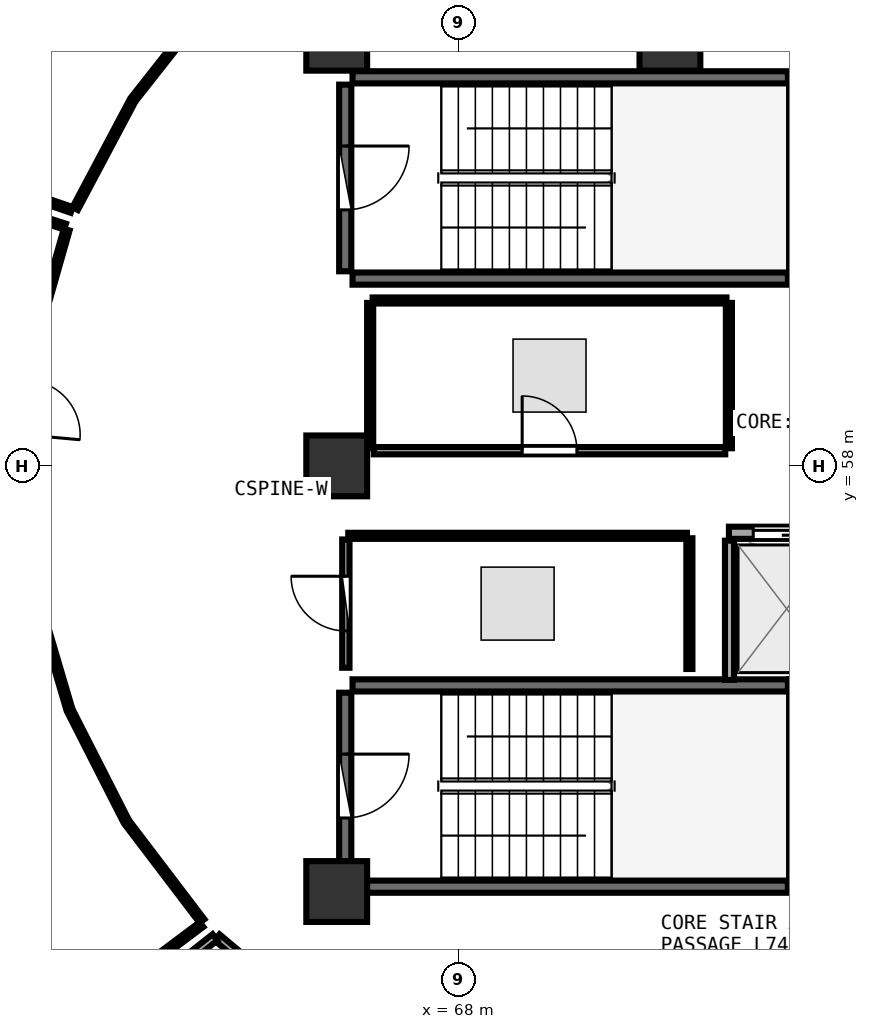
"""IFC4 building model, lengths in metres.
Left out: names, types, materials, properties, quantities, classifications, styles, units other than length and angle.
Written with IfcOpenShell. Run it as: python <this file> out.ifc"""

import sys

from ifc_helpers import new_model, si_unit, direction, frame, frame_2d, origin, origin_2d, place, context, subcontext, project, spatial, rectangle, extrude, element, fill, save


model = new_model("IFC4")
c1 = context("Model", 3, precision=1e-05, world=origin(), true_north=direction((0.0, 1.0)))
c2 = subcontext(c1, "Body", "Model", "MODEL_VIEW")
j1 = project(units=[si_unit("LENGTHUNIT", "METRE"), si_unit("PLANEANGLEUNIT", "RADIAN")], contexts=[c1])
p1 = place(None, origin())
s1 = spatial("IfcSite", under=j1, at=p1, CompositionType="ELEMENT")
p2 = place(p1, origin())
s2 = spatial("IfcBuilding", under=s1, at=p2, CompositionType="ELEMENT")
p3 = place(p2, frame((0.0, 0.0, 289.95)))
s3 = spatial("IfcBuildingStorey", under=s2, at=p3, CompositionType="ELEMENT", Elevation=289.95)
for number, where, z_axis, x_axis in (
    (1, (66.0, 51.0, 0.0), (0.0, 0.0, 1.0), (1.0, 0.0, 0.0)),
    (2, (71.48, 65.0, 0.0), (0.0, 0.0, 1.0), (1.0, 0.0, 0.0)),
    (3, (66.0, 65.0, 0.0), (0.0, 0.0, 1.0), (1.0, 0.0, 0.0)),
    (4, (66.0, 58.0, 0.0), (0.0, 0.0, 1.0), (1.0, 0.0, 0.0)),
):
    element("IfcColumn", number, at=place(p3, frame(where, z_axis=z_axis, x_axis=x_axis)), inside=s3, PredefinedType="PILASTER", context=c2, shape_type="SweptSolid", body=[
        extrude(rectangle(XDim=1.0, YDim=1.0, at=origin_2d()), origin(), (0.0, 0.0, 1.0), 3.75),
    ])
p4 = place(p3, frame((66.26, 61.08, 0.0), z_axis=(0.0, 0.0, 1.0), x_axis=(1.0, 0.0, 0.0)))
e5 = element("IfcWall", 5, at=p4, inside=s3, PredefinedType="SHEAR", context=c2, shape_type="SweptSolid", body=[
    extrude(rectangle(XDim=7.16, YDim=0.2, at=frame_2d((3.58, 0.0))), origin(), (0.0, 0.0, 1.0), 3.43),
])
p5 = place(p3, frame((73.54, 61.2, 0.0), z_axis=(0.0, 0.0, 1.0), x_axis=(0.0, 1.0, 0.0)))
e6 = element("IfcWall", 6, at=p5, inside=s3, PredefinedType="SHEAR", context=c2, shape_type="SweptSolid", body=[
    extrude(rectangle(XDim=3.07, YDim=0.2, at=frame_2d((1.535, 0.0))), origin(), (0.0, 0.0, 1.0), 3.43),
])
p6 = place(p3, frame((73.42, 64.39, 0.0), z_axis=(0.0, 0.0, 1.0), x_axis=(-1.0, 0.0, 0.0)))
e7 = element("IfcWall", 7, at=p6, inside=s3, PredefinedType="SHEAR", context=c2, shape_type="SweptSolid", body=[
    extrude(rectangle(XDim=7.16, YDim=0.2, at=frame_2d((3.58, 0.0))), origin(), (0.0, 0.0, 1.0), 3.43),
])
p7 = place(p3, frame((66.14, 64.27, 0.0), z_axis=(0.0, 0.0, 1.0), x_axis=(0.0, -1.0, 0.0)))
e8 = element("IfcWall", 8, at=p7, inside=s3, PredefinedType="SHEAR", context=c2, shape_type="SweptSolid", body=[
    extrude(rectangle(XDim=3.07, YDim=0.2, at=frame_2d((1.535, 0.0))), origin(), (0.0, 0.0, 1.0), 3.43),
])
p8 = place(p7, frame((1.01, 0.0, 0.0)))
e9 = element("IfcOpeningElement", 9, at=p8, cuts=e8, PredefinedType="OPENING", context=c2, shape_type="SweptSolid", body=[
    extrude(rectangle(XDim=1.05, YDim=2.1, at=frame_2d((0.525, 1.05))), frame((0.0, 0.11, 0.0), z_axis=(0.0, -1.0, 0.0), x_axis=(1.0, 0.0, 0.0)), (0.0, 0.0, 1.0), 0.22),
])
p9 = place(p3, frame((81.9, 54.39, 0.0), z_axis=(0.0, 0.0, 1.0), x_axis=(-1.0, 0.0, 0.0)))
e10 = element("IfcWall", 10, at=p9, inside=s3, PredefinedType="SHEAR", context=c2, shape_type="SweptSolid", body=[
    extrude(rectangle(XDim=8.46, YDim=0.2, at=frame_2d((4.23, 0.0))), origin(), (0.0, 0.0, 1.0), 3.43),
])
p10 = place(p3, frame((66.26, 51.08, 0.0), z_axis=(0.0, 0.0, 1.0), x_axis=(1.0, 0.0, 0.0)))
e11 = element("IfcWall", 11, at=p10, inside=s3, PredefinedType="SHEAR", context=c2, shape_type="SweptSolid", body=[
    extrude(rectangle(XDim=7.16, YDim=0.2, at=frame_2d((3.58, 0.0))), origin(), (0.0, 0.0, 1.0), 3.43),
])
p11 = place(p3, frame((73.54, 51.2, 0.0), z_axis=(0.0, 0.0, 1.0), x_axis=(0.0, 1.0, 0.0)))
e12 = element("IfcWall", 12, at=p11, inside=s3, PredefinedType="SHEAR", context=c2, shape_type="SweptSolid", body=[
    extrude(rectangle(XDim=3.07, YDim=0.2, at=frame_2d((1.535, 0.0))), origin(), (0.0, 0.0, 1.0), 3.43),
])
p12 = place(p3, frame((73.42, 54.39, 0.0), z_axis=(0.0, 0.0, 1.0), x_axis=(-1.0, 0.0, 0.0)))
e13 = element("IfcWall", 13, at=p12, inside=s3, PredefinedType="SHEAR", context=c2, shape_type="SweptSolid", body=[
    extrude(rectangle(XDim=7.16, YDim=0.2, at=frame_2d((3.58, 0.0))), origin(), (0.0, 0.0, 1.0), 3.43),
])
p13 = place(p3, frame((66.14, 54.27, 0.0), z_axis=(0.0, 0.0, 1.0), x_axis=(0.0, -1.0, 0.0)))
e14 = element("IfcWall", 14, at=p13, inside=s3, PredefinedType="SHEAR", context=c2, shape_type="SweptSolid", body=[
    extrude(rectangle(XDim=3.07, YDim=0.2, at=frame_2d((1.535, 0.0))), origin(), (0.0, 0.0, 1.0), 3.43),
])
p14 = place(p13, frame((1.01, 0.0, 0.0)))
e15 = element("IfcOpeningElement", 15, at=p14, cuts=e14, PredefinedType="OPENING", context=c2, shape_type="SweptSolid", body=[
    extrude(rectangle(XDim=1.05, YDim=2.1, at=frame_2d((0.525, 1.05))), frame((0.0, 0.11, 0.0), z_axis=(0.0, -1.0, 0.0), x_axis=(1.0, 0.0, 0.0)), (0.0, 0.0, 1.0), 0.22),
])
p15 = place(p3, frame((72.45, 56.9, 0.0), z_axis=(0.0, 0.0, 1.0), x_axis=(1.0, 0.0, 0.0)))
e16 = element("IfcWall", 16, at=p15, inside=s3, PredefinedType="SOLIDWALL", context=c2, shape_type="SweptSolid", body=[
    extrude(rectangle(XDim=8.4, YDim=0.2, at=frame_2d((4.2, 0.0))), origin(), (0.0, 0.0, 1.0), 3.42),
])
p16 = place(p15, frame((0.4, 0.0, 0.0)))
e17 = element("IfcOpeningElement", 17, at=p16, cuts=e16, PredefinedType="OPENING", context=c2, shape_type="SweptSolid", body=[
    extrude(rectangle(XDim=1.1, YDim=2.1, at=frame_2d((0.55, 1.05))), frame((0.0, 0.11, 0.0), z_axis=(0.0, -1.0, 0.0), x_axis=(1.0, 0.0, 0.0)), (0.0, 0.0, 1.0), 0.22),
])
p17 = place(p15, frame((2.4, 0.0, 0.0)))
e18 = element("IfcOpeningElement", 18, at=p17, cuts=e16, PredefinedType="OPENING", context=c2, shape_type="SweptSolid", body=[
    extrude(rectangle(XDim=1.1, YDim=2.1, at=frame_2d((0.55, 1.05))), frame((0.0, 0.11, 0.0), z_axis=(0.0, -1.0, 0.0), x_axis=(1.0, 0.0, 0.0)), (0.0, 0.0, 1.0), 0.22),
])
p18 = place(p3, frame((72.46, 54.48, 0.0), z_axis=(0.0, 0.0, 1.0), x_axis=(0.0, 1.0, 0.0)))
e19 = element("IfcWall", 19, at=p18, inside=s3, PredefinedType="PARTITIONING", context=c2, shape_type="SweptSolid", body=[
    extrude(rectangle(XDim=2.29, YDim=0.15, at=frame_2d((1.145, 0.0))), origin(), (0.0, 0.0, 1.0), 3.42),
])
p19 = place(p3, frame((66.61, 58.25, 0.0), z_axis=(0.0, 0.0, 1.0), x_axis=(1.0, 0.0, 0.0)))
e20 = element("IfcWall", 20, at=p19, inside=s3, PredefinedType="PARTITIONING", context=c2, shape_type="SweptSolid", body=[
    extrude(rectangle(XDim=5.78, YDim=0.12, at=frame_2d((2.89, 0.0))), origin(), (0.0, 0.0, 1.0), 3.42),
])
p20 = place(p19, frame((2.44, 0.0, 0.0)))
e21 = element("IfcOpeningElement", 21, at=p20, cuts=e20, PredefinedType="OPENING", context=c2, shape_type="SweptSolid", body=[
    extrude(rectangle(XDim=0.9, YDim=2.08, at=frame_2d((0.45, 1.04))), frame((0.0, 0.07, 0.0), z_axis=(0.0, -1.0, 0.0), x_axis=(1.0, 0.0, 0.0)), (0.0, 0.0, 1.0), 0.14),
])
p21 = place(p3, frame((66.15, 54.68, 0.0), z_axis=(0.0, 0.0, 1.0), x_axis=(0.0, 1.0, 0.0)))
e22 = element("IfcWall", 22, at=p21, inside=s3, PredefinedType="PARTITIONING", context=c2, shape_type="SweptSolid", body=[
    extrude(rectangle(XDim=2.11, YDim=0.12, at=frame_2d((1.055, 0.0))), origin(), (0.0, 0.0, 1.0), 2.715),
])
p22 = place(p21, frame((0.605, 0.0, 0.0)))
e23 = element("IfcOpeningElement", 23, at=p22, cuts=e22, PredefinedType="OPENING", context=c2, shape_type="SweptSolid", body=[
    extrude(rectangle(XDim=0.9, YDim=2.08, at=frame_2d((0.45, 1.04))), frame((0.0, 0.07, 0.0), z_axis=(0.0, -1.0, 0.0), x_axis=(1.0, 0.0, 0.0)), (0.0, 0.0, 1.0), 0.14),
])
p23 = place(p3, frame((72.45, 58.29, 0.0), z_axis=(0.0, 0.0, 1.0), x_axis=(0.0, 1.0, 0.0)))
e24 = element("IfcWall", 24, at=p23, inside=s3, PredefinedType="PARTITIONING", context=c2, shape_type="SweptSolid", body=[
    extrude(rectangle(XDim=2.39, YDim=0.1, at=frame_2d((1.195, 0.0))), origin(), (0.0, 0.0, 1.0), 3.42),
])
p24 = place(p3, frame((72.41, 60.72, 0.0), z_axis=(0.0, 0.0, 1.0), x_axis=(-1.0, 0.0, 0.0)))
e25 = element("IfcWall", 25, at=p24, inside=s3, PredefinedType="PARTITIONING", context=c2, shape_type="SweptSolid", body=[
    extrude(rectangle(XDim=5.82, YDim=0.1, at=frame_2d((2.91, 0.0))), origin(), (0.0, 0.0, 1.0), 3.42),
])
p25 = place(p3, frame((66.55, 60.68, 0.0), z_axis=(0.0, 0.0, 1.0), x_axis=(0.0, -1.0, 0.0)))
e26 = element("IfcWall", 26, at=p25, inside=s3, PredefinedType="PARTITIONING", context=c2, shape_type="SweptSolid", body=[
    extrude(rectangle(XDim=2.39, YDim=0.1, at=frame_2d((1.195, 0.0))), origin(), (0.0, 0.0, 1.0), 3.42),
])
p26 = place(p3, frame((71.8, 54.66, 0.0), z_axis=(0.0, 0.0, 1.0), x_axis=(0.0, 1.0, 0.0)))
e27 = element("IfcWall", 27, at=p26, inside=s3, PredefinedType="PARTITIONING", context=c2, shape_type="SweptSolid", body=[
    extrude(rectangle(XDim=2.15, YDim=0.1, at=frame_2d((1.075, 0.0))), origin(), (0.0, 0.0, 1.0), 3.42),
])
p27 = place(p3, frame((71.76, 56.85, 0.0), z_axis=(0.0, 0.0, 1.0), x_axis=(-1.0, 0.0, 0.0)))
e28 = element("IfcWall", 28, at=p27, inside=s3, PredefinedType="PARTITIONING", context=c2, shape_type="SweptSolid", body=[
    extrude(rectangle(XDim=5.57, YDim=0.1, at=frame_2d((2.785, 0.0))), origin(), (0.0, 0.0, 1.0), 2.715),
])
p28 = place(p3, frame((63.921, 65.635, 0.0), z_axis=(0.0, 0.0, 1.0), x_axis=(-0.618820199788, -0.785532660259, 0.0)))
e29 = element("IfcWall", 29, at=p28, inside=s3, PredefinedType="PARTITIONING", context=c2, shape_type="SweptSolid", body=[
    extrude(rectangle(XDim=2.018, YDim=0.1, at=frame_2d((1.009, 0.0))), origin(), (0.0, 0.0, 1.0), 3.015),
])
p29 = place(p3, frame((62.629, 63.984, 0.0), z_axis=(0.0, 0.0, 1.0), x_axis=(-0.468933294906, -0.883233584579, 0.0)))
e30 = element("IfcWall", 30, at=p29, inside=s3, PredefinedType="PARTITIONING", context=c2, shape_type="SweptSolid", body=[
    extrude(rectangle(XDim=1.984, YDim=0.1, at=frame_2d((0.992, 0.0))), origin(), (0.0, 0.0, 1.0), 3.175),
])
p30 = place(p3, frame((61.642, 62.209, 0.0), z_axis=(0.0, 0.0, 1.0), x_axis=(-0.945103281494, 0.326771766388, 0.0)))
e31 = element("IfcWall", 31, at=p30, inside=s3, PredefinedType="PARTITIONING", context=c2, shape_type="SweptSolid", body=[
    extrude(rectangle(XDim=4.604, YDim=0.1, at=frame_2d((2.302, 0.0))), origin(), (0.0, 0.0, 1.0), 3.015),
])
p31 = place(p3, frame((61.559, 61.885, 0.0), z_axis=(0.0, 0.0, 1.0), x_axis=(-0.274226302341, -0.961665188673, 0.0)))
e32 = element("IfcWall", 32, at=p31, inside=s3, PredefinedType="PARTITIONING", context=c2, shape_type="SweptSolid", body=[
    extrude(rectangle(XDim=1.955, YDim=0.1, at=frame_2d((0.978, 0.0))), origin(), (0.0, 0.0, 1.0), 3.42),
])
p32 = place(p3, frame((61.041, 55.901, 0.0), z_axis=(0.0, 0.0, 1.0), x_axis=(0.28293653612, -0.959138632591, 0.0)))
e33 = element("IfcWall", 33, at=p32, inside=s3, PredefinedType="PARTITIONING", context=c2, shape_type="SweptSolid", body=[
    extrude(rectangle(XDim=1.956, YDim=0.1, at=frame_2d((0.978, 0.0))), origin(), (0.0, 0.0, 1.0), 3.42),
])
p33 = place(p3, frame((61.624, 53.95, 0.0), z_axis=(0.0, 0.0, 1.0), x_axis=(0.453658133306, -0.891175795276, 0.0)))
e34 = element("IfcWall", 34, at=p33, inside=s3, PredefinedType="PARTITIONING", context=c2, shape_type="SweptSolid", body=[
    extrude(rectangle(XDim=1.981, YDim=0.1, at=frame_2d((0.991, 0.0))), origin(), (0.0, 0.0, 1.0), 3.175),
])
p34 = place(p3, frame((62.565, 52.117, 0.0), z_axis=(0.0, 0.0, 1.0), x_axis=(0.605473441765, -0.795865510823, 0.0)))
e35 = element("IfcWall", 35, at=p34, inside=s3, PredefinedType="PARTITIONING", context=c2, shape_type="SweptSolid", body=[
    extrude(rectangle(XDim=2.014, YDim=0.1, at=frame_2d((1.007, 0.0))), origin(), (0.0, 0.0, 1.0), 3.015),
])
p35 = place(p3, frame((63.777, 50.458, 0.0), z_axis=(0.0, 0.0, 1.0), x_axis=(-0.800384816546, -0.599486568191, 0.0)))
e36 = element("IfcWall", 36, at=p35, inside=s3, PredefinedType="PARTITIONING", context=c2, shape_type="SweptSolid", body=[
    extrude(rectangle(XDim=4.414, YDim=0.1, at=frame_2d((2.207, 0.0))), origin(), (0.0, 0.0, 1.0), 3.115),
])
p36 = place(p3, frame((57.184, 63.329, 0.0), z_axis=(0.0, 0.0, 1.0), x_axis=(0.95227750557, -0.305233602976, 0.0)))
e37 = element("IfcWall", 37, at=p36, inside=s3, PredefinedType="PARTITIONING", context=c2, shape_type="SweptSolid", body=[
    extrude(rectangle(XDim=4.565, YDim=0.1, at=frame_2d((2.283, 0.0))), origin(), (0.0, 0.0, 1.0), 3.115),
])
p37 = place(p3, frame((64.03, 50.247, 0.0), z_axis=(0.0, 0.0, 1.0), x_axis=(0.766167599315, -0.642640809286, 0.0)))
e38 = element("IfcWall", 38, at=p37, inside=s3, PredefinedType="PLUMBINGWALL", context=c2, shape_type="SweptSolid", body=[
    extrude(rectangle(XDim=2.753, YDim=0.13, at=frame_2d((1.376, 0.0))), origin(), (0.0, 0.0, 1.0), 3.015),
])
p38 = place(p3, frame((62.097, 48.751, 0.0), z_axis=(0.0, 0.0, 1.0), x_axis=(0.786076764473, 0.618128886525, 0.0)))
e39 = element("IfcWall", 39, at=p38, inside=s3, PredefinedType="PLUMBINGWALL", context=c2, shape_type="SweptSolid", body=[
    extrude(rectangle(XDim=2.42, YDim=0.13, at=frame_2d((1.21, 0.0))), origin(), (0.0, 0.0, 1.0), 3.015),
])
p39 = place(p8, origin())
e40 = element("IfcDoor", 40, at=p39, inside=s3, OperationType="SINGLE_SWING_LEFT", PredefinedType="DOOR", context=c2, shape_type="SweptSolid", body=[
    extrude(rectangle(XDim=1.05, YDim=2.1, at=frame_2d((0.525, 1.05))), frame((0.0, 0.025, 0.0), z_axis=(0.0, -1.0, 0.0), x_axis=(1.0, 0.0, 0.0)), (0.0, 0.0, 1.0), 0.05),
])
fill(e9, e40)
p40 = place(p14, origin())
e41 = element("IfcDoor", 41, at=p40, inside=s3, OperationType="SINGLE_SWING_LEFT", PredefinedType="DOOR", context=c2, shape_type="SweptSolid", body=[
    extrude(rectangle(XDim=1.05, YDim=2.1, at=frame_2d((0.525, 1.05))), frame((0.0, 0.025, 0.0), z_axis=(0.0, -1.0, 0.0), x_axis=(1.0, 0.0, 0.0)), (0.0, 0.0, 1.0), 0.05),
])
fill(e15, e41)
p41 = place(p16, origin())
e42 = element("IfcDoor", 42, at=p41, inside=s3, OperationType="DOUBLE_DOOR_SLIDING", PredefinedType="DOOR", context=c2, shape_type="SweptSolid", body=[
    extrude(rectangle(XDim=1.1, YDim=2.1, at=frame_2d((0.55, 1.05))), frame((0.0, 0.025, 0.0), z_axis=(0.0, -1.0, 0.0), x_axis=(1.0, 0.0, 0.0)), (0.0, 0.0, 1.0), 0.05),
])
fill(e17, e42)
p42 = place(p20, origin())
e43 = element("IfcDoor", 43, at=p42, inside=s3, OperationType="SINGLE_SWING_LEFT", PredefinedType="DOOR", context=c2, shape_type="SweptSolid", body=[
    extrude(rectangle(XDim=0.9, YDim=2.08, at=frame_2d((0.45, 1.04))), frame((0.0, 0.025, 0.0), z_axis=(0.0, -1.0, 0.0), x_axis=(1.0, 0.0, 0.0)), (0.0, 0.0, 1.0), 0.05),
])
fill(e21, e43)
p43 = place(p22, origin())
e44 = element("IfcDoor", 44, at=p43, inside=s3, OperationType="SINGLE_SWING_RIGHT", PredefinedType="DOOR", context=c2, shape_type="SweptSolid", body=[
    extrude(rectangle(XDim=0.9, YDim=2.08, at=frame_2d((0.45, 1.04))), frame((0.0, 0.025, 0.0), z_axis=(0.0, -1.0, 0.0), x_axis=(1.0, 0.0, 0.0)), (0.0, 0.0, 1.0), 0.05),
])
fill(e23, e44)
save(model, sys.argv[1])
